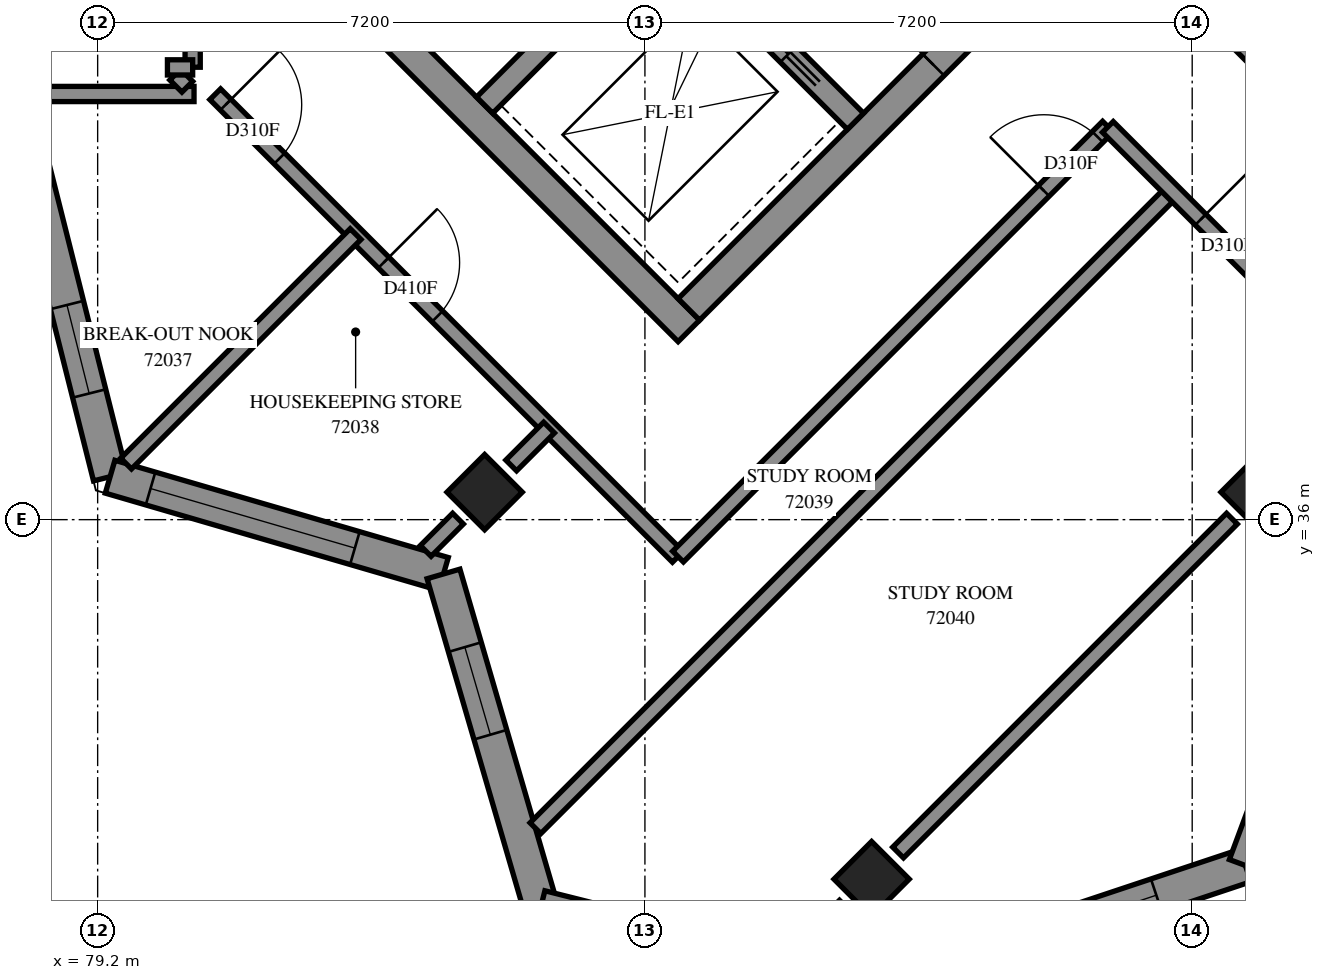
"""IFC4 building model, lengths in metres.
Left out: names, types, materials, properties, quantities, classifications, styles, units other than length and angle.
Written with IfcOpenShell. Run it as: python <this file> out.ifc"""

import sys

from ifc_helpers import new_model, si_unit, direction, frame, frame_2d, origin, origin_2d, place, context, subcontext, project, spatial, polyline, rectangle, outline, extrude, element, fill, save


model = new_model("IFC4")
c1 = context("Model", 3, precision=1e-05, world=origin(), true_north=direction((0.0, 1.0)))
c2 = subcontext(c1, "Body", "Model", "MODEL_VIEW")
j1 = project(units=[si_unit("LENGTHUNIT", "METRE"), si_unit("PLANEANGLEUNIT", "RADIAN")], contexts=[c1])
p1 = place(None, origin())
s1 = spatial("IfcSite", under=j1, at=p1, CompositionType="ELEMENT")
p2 = place(p1, origin())
s2 = spatial("IfcBuilding", under=s1, at=p2, CompositionType="ELEMENT")
p3 = place(p2, frame((0.0, 0.0, 264.2)))
s3 = spatial("IfcBuildingStorey", under=s2, at=p3, CompositionType="ELEMENT", Elevation=264.2)
for number, where, z_axis, x_axis in (
    (1, (84.291, 36.362, 0.0), (0.0, 0.0, 1.0), (0.707, -0.707, 0.0)),
    (2, (94.474, 36.362, 0.0), (0.0, 0.0, 1.0), (0.707, -0.707, 0.0)),
    (3, (89.382, 31.271, 0.0), (0.0, 0.0, 1.0), (0.707, -0.707, 0.0)),
):
    element("IfcColumn", number, at=place(p3, frame(where, z_axis=z_axis, x_axis=x_axis)), inside=s3, PredefinedType="COLUMN", context=c2, shape_type="SweptSolid", body=[
        extrude(rectangle(XDim=0.7, YDim=0.7, at=origin_2d()), origin(), (0.0, 0.0, 1.0), 3.1),
    ])
p4 = place(p3, frame((76.23, 49.231, -0.3), z_axis=(0.0, 0.0, 1.0), x_axis=(0.7071034917, -0.7071100706, 0.0)))
e4 = element("IfcWall", 4, at=p4, inside=s3, PredefinedType="SHEAR", context=c2, shape_type="SweptSolid", body=[
    extrude(rectangle(XDim=15.2, YDim=0.4, at=frame_2d((7.6, 0.0))), origin(), (0.0, 0.0, 1.0), 2.7),
])
p5 = place(p3, frame((86.978, 38.766, -0.3), z_axis=(0.0, 0.0, 1.0), x_axis=(0.7071067812, 0.7071067812, 0.0)))
e5 = element("IfcWall", 5, at=p5, inside=s3, PredefinedType="SHEAR", context=c2, shape_type="SweptSolid", body=[
    extrude(rectangle(XDim=14.4, YDim=0.4, at=frame_2d((7.2, 0.0))), origin(), (0.0, 0.0, 1.0), 2.7),
])
p6 = place(p5, frame((4.55, 0.0, 0.3)))
e6 = element("IfcOpeningElement", 6, at=p6, cuts=e5, PredefinedType="OPENING", context=c2, shape_type="SweptSolid", body=[
    extrude(rectangle(XDim=1.1, YDim=2.1, at=frame_2d((0.55, 1.05))), frame((0.0, 0.21, 0.0), z_axis=(0.0, -1.0, 0.0), x_axis=(1.0, 0.0, 0.0)), (0.0, 0.0, 1.0), 0.42),
])
p7 = place(p5, frame((11.35, 0.0, 0.3)))
e7 = element("IfcOpeningElement", 7, at=p7, cuts=e5, PredefinedType="OPENING", context=c2, shape_type="SweptSolid", body=[
    extrude(rectangle(XDim=1.1, YDim=2.1, at=frame_2d((0.55, 1.05))), frame((0.0, 0.21, 0.0), z_axis=(0.0, -1.0, 0.0), x_axis=(1.0, 0.0, 0.0)), (0.0, 0.0, 1.0), 0.42),
])
p8 = place(p3, frame((84.291, 41.453, 0.0), z_axis=(0.0, 0.0, 1.0), x_axis=(0.7071067812, 0.7071067812, 0.0)))
e8 = element("IfcWall", 8, at=p8, inside=s3, PredefinedType="SOLIDWALL", context=c2, shape_type="SweptSolid", body=[
    extrude(rectangle(XDim=3.3, YDim=0.3, at=frame_2d((1.65, 0.0))), origin(), (0.0, 0.0, 1.0), 3.1),
])
p9 = place(p3, frame((78.988, 51.423, 0.0), z_axis=(0.0, 0.0, 1.0), x_axis=(0.7071067812, -0.7071067812, 0.0)))
e9 = element("IfcWall", 9, at=p9, inside=s3, PredefinedType="SOLIDWALL", context=c2, shape_type="SweptSolid", body=[
    extrude(rectangle(XDim=14.4, YDim=0.3, at=frame_2d((7.2, 0.0))), origin(), (0.0, 0.0, 1.0), 3.1),
])
p10 = place(p9, frame((1.35, 0.0, 0.0)))
e10 = element("IfcOpeningElement", 10, at=p10, cuts=e9, PredefinedType="OPENING", context=c2, shape_type="SweptSolid", body=[
    extrude(rectangle(XDim=0.9, YDim=2.1, at=frame_2d((0.45, 1.05))), frame((0.0, 0.16, 0.0), z_axis=(0.0, -1.0, 0.0), x_axis=(1.0, 0.0, 0.0)), (0.0, 0.0, 1.0), 0.32),
])
p11 = place(p9, frame((4.95, 0.0, 0.0)))
e11 = element("IfcOpeningElement", 11, at=p11, cuts=e9, PredefinedType="OPENING", context=c2, shape_type="SweptSolid", body=[
    extrude(rectangle(XDim=0.9, YDim=2.1, at=frame_2d((0.45, 1.05))), frame((0.0, 0.16, 0.0), z_axis=(0.0, -1.0, 0.0), x_axis=(1.0, 0.0, 0.0)), (0.0, 0.0, 1.0), 0.32),
])
p12 = place(p9, frame((8.55, 0.0, 0.0)))
e12 = element("IfcOpeningElement", 12, at=p12, cuts=e9, PredefinedType="OPENING", context=c2, shape_type="SweptSolid", body=[
    extrude(rectangle(XDim=0.9, YDim=2.1, at=frame_2d((0.45, 1.05))), frame((0.0, 0.16, 0.0), z_axis=(0.0, -1.0, 0.0), x_axis=(1.0, 0.0, 0.0)), (0.0, 0.0, 1.0), 0.32),
])
p13 = place(p9, frame((12.05, 0.0, 0.0)))
e13 = element("IfcOpeningElement", 13, at=p13, cuts=e9, PredefinedType="OPENING", context=c2, shape_type="SweptSolid", body=[
    extrude(rectangle(XDim=1.1, YDim=2.1, at=frame_2d((0.55, 1.05))), frame((0.0, 0.16, 0.0), z_axis=(0.0, -1.0, 0.0), x_axis=(1.0, 0.0, 0.0)), (0.0, 0.0, 1.0), 0.32),
])
p14 = place(p3, frame((89.373, 29.808, 0.0), z_axis=(0.0, 0.0, 1.0), x_axis=(0.9486852236, 0.3162219892, 0.0)))
e14 = element("IfcWall", 14, at=p14, inside=s3, PredefinedType="SOLIDWALL", context=c2, shape_type="SweptSolid", body=[
    extrude(outline(polyline([(-0.066, -0.225), (5.301, -0.225), (5.085, 0.225), (0.066, 0.225), (-0.066, -0.225)])), origin(), (0.0, 0.0, 1.0), 3.1),
])
p15 = place(p14, frame((1.158, 0.0, 0.45)))
e15 = element("IfcOpeningElement", 15, at=p15, cuts=e14, PredefinedType="OPENING", context=c2, shape_type="SweptSolid", body=[
    extrude(rectangle(XDim=2.8, YDim=2.55, at=frame_2d((1.4, 1.275))), frame((0.0, 0.235, 0.0), z_axis=(0.0, -1.0, 0.0), x_axis=(1.0, 0.0, 0.0)), (0.0, 0.0, 1.0), 0.47),
])
p16 = place(p3, frame((94.3, 31.45, 0.0), z_axis=(0.0, 0.0, 1.0), x_axis=(0.3481927166, 0.9374229739, 0.0)))
e16 = element("IfcWall", 16, at=p16, inside=s3, PredefinedType="SOLIDWALL", context=c2, shape_type="SweptSolid", body=[
    extrude(outline(polyline([(-0.108, -0.225), (5.172, -0.225), (5.379, 0.225), (0.108, 0.225), (-0.108, -0.225)])), origin(), (0.0, 0.0, 1.0), 3.1),
])
p17 = place(p16, frame((1.534, 0.0, 0.45)))
e17 = element("IfcOpeningElement", 17, at=p17, cuts=e16, PredefinedType="OPENING", context=c2, shape_type="SweptSolid", body=[
    extrude(rectangle(XDim=2.8, YDim=2.55, at=frame_2d((1.4, 1.275))), frame((0.0, 0.235, 0.0), z_axis=(0.0, -1.0, 0.0), x_axis=(1.0, 0.0, 0.0)), (0.0, 0.0, 1.0), 0.47),
])
p18 = place(p3, frame((78.225, 41.097, 0.0), z_axis=(0.0, 0.0, 1.0), x_axis=(0.2436835103, -0.9698548071, 0.0)))
e18 = element("IfcWall", 18, at=p18, inside=s3, PredefinedType="SOLIDWALL", context=c2, shape_type="SweptSolid", body=[
    extrude(outline(polyline([(0.128, -0.225), (4.802, -0.225), (4.544, 0.225), (-0.128, 0.225), (0.128, -0.225)])), origin(), (0.0, 0.0, 1.0), 3.1),
])
p19 = place(p18, frame((2.344, 0.0, 0.45)))
e19 = element("IfcOpeningElement", 19, at=p19, cuts=e18, PredefinedType="OPENING", context=c2, shape_type="SweptSolid", body=[
    extrude(rectangle(XDim=1.2, YDim=2.55, at=frame_2d((0.6, 1.275))), frame((0.0, 0.235, 0.0), z_axis=(0.0, -1.0, 0.0), x_axis=(1.0, 0.0, 0.0)), (0.0, 0.0, 1.0), 0.47),
])
p20 = place(p3, frame((79.364, 36.565, 0.0), z_axis=(0.0, 0.0, 1.0), x_axis=(0.9600215683, -0.2799260409, 0.0)))
e20 = element("IfcWall", 20, at=p20, inside=s3, PredefinedType="SOLIDWALL", context=c2, shape_type="SweptSolid", body=[
    extrude(outline(polyline([(-0.129, -0.225), (4.446, -0.225), (4.692, 0.225), (0.129, 0.225), (-0.129, -0.225)])), origin(), (0.0, 0.0, 1.0), 3.1),
])
p21 = place(p20, frame((0.554, 0.0, 0.45)))
e21 = element("IfcOpeningElement", 21, at=p21, cuts=e20, PredefinedType="OPENING", context=c2, shape_type="SweptSolid", body=[
    extrude(rectangle(XDim=2.8, YDim=2.55, at=frame_2d((1.4, 1.275))), frame((0.0, 0.235, 0.0), z_axis=(0.0, -1.0, 0.0), x_axis=(1.0, 0.0, 0.0)), (0.0, 0.0, 1.0), 0.47),
])
p22 = place(p3, frame((83.75, 35.286, 0.0), z_axis=(0.0, 0.0, 1.0), x_axis=(0.2799260409, -0.9600215683, 0.0)))
e22 = element("IfcWall", 22, at=p22, inside=s3, PredefinedType="SOLIDWALL", context=c2, shape_type="SweptSolid", body=[
    extrude(outline(polyline([(0.123, -0.225), (4.698, -0.225), (4.44, 0.225), (-0.123, 0.225), (0.123, -0.225)])), origin(), (0.0, 0.0, 1.0), 3.1),
])
p23 = place(p22, frame((1.003, 0.0, 0.45)))
e23 = element("IfcOpeningElement", 23, at=p23, cuts=e22, PredefinedType="OPENING", context=c2, shape_type="SweptSolid", body=[
    extrude(rectangle(XDim=1.2, YDim=2.55, at=frame_2d((0.6, 1.275))), frame((0.0, 0.235, 0.0), z_axis=(0.0, -1.0, 0.0), x_axis=(1.0, 0.0, 0.0)), (0.0, 0.0, 1.0), 0.47),
])
p24 = place(p3, frame((85.029, 30.899, 0.0), z_axis=(0.0, 0.0, 1.0), x_axis=(0.9698515846, -0.2436963354, 0.0)))
e24 = element("IfcWall", 24, at=p24, inside=s3, PredefinedType="SOLIDWALL", context=c2, shape_type="SweptSolid", body=[
    extrude(outline(polyline([(-0.129, -0.225), (4.545, -0.225), (4.414, 0.225), (0.129, 0.225), (-0.129, -0.225)])), origin(), (0.0, 0.0, 1.0), 3.1),
])
p25 = place(p24, frame((2.064, 0.0, 0.45)))
e25 = element("IfcOpeningElement", 25, at=p25, cuts=e24, PredefinedType="OPENING", context=c2, shape_type="SweptSolid", body=[
    extrude(rectangle(XDim=1.2, YDim=2.55, at=frame_2d((0.6, 1.275))), frame((0.0, 0.235, 0.0), z_axis=(0.0, -1.0, 0.0), x_axis=(1.0, 0.0, 0.0)), (0.0, 0.0, 1.0), 0.47),
])
p26 = place(p3, frame((84.96, 31.941, 0.0), z_axis=(0.0, 0.0, 1.0), x_axis=(0.707102563, 0.7071109994, 0.0)))
e26 = element("IfcWall", 26, at=p26, inside=s3, PredefinedType="PARTITIONING", context=c2, shape_type="SweptSolid", body=[
    extrude(rectangle(XDim=11.853, YDim=0.2, at=frame_2d((5.927, 0.0))), origin(), (0.0, 0.0, 1.0), 3.1),
])
p27 = place(p3, frame((80.747, 41.597, 0.0), z_axis=(0.0, 0.0, 1.0), x_axis=(0.7071067812, -0.7071067812, 0.0)))
e27 = element("IfcWall", 27, at=p27, inside=s3, PredefinedType="PARTITIONING", context=c2, shape_type="SweptSolid", body=[
    extrude(rectangle(XDim=8.607, YDim=0.2, at=frame_2d((4.303, 0.0))), origin(), (0.0, 0.0, 1.0), 3.1),
])
p28 = place(p27, frame((0.195, 0.0, 0.0)))
e28 = element("IfcOpeningElement", 28, at=p28, cuts=e27, PredefinedType="OPENING", context=c2, shape_type="SweptSolid", body=[
    extrude(rectangle(XDim=1.0, YDim=2.1, at=frame_2d((0.5, 1.05))), frame((0.0, 0.11, 0.0), z_axis=(0.0, -1.0, 0.0), x_axis=(1.0, 0.0, 0.0)), (0.0, 0.0, 1.0), 0.22),
])
p29 = place(p27, frame((3.133, 0.0, 0.0)))
e29 = element("IfcOpeningElement", 29, at=p29, cuts=e27, PredefinedType="OPENING", context=c2, shape_type="SweptSolid", body=[
    extrude(rectangle(XDim=1.0, YDim=2.1, at=frame_2d((0.5, 1.05))), frame((0.0, 0.11, 0.0), z_axis=(0.0, -1.0, 0.0), x_axis=(1.0, 0.0, 0.0)), (0.0, 0.0, 1.0), 0.22),
])
p30 = place(p3, frame((86.836, 35.514, 0.0), z_axis=(0.0, 0.0, 1.0), x_axis=(0.7071067812, 0.7071067812, 0.0)))
e30 = element("IfcWall", 30, at=p30, inside=s3, PredefinedType="PARTITIONING", context=c2, shape_type="SweptSolid", body=[
    extrude(rectangle(XDim=7.999, YDim=0.2, at=frame_2d((3.999, 0.0))), origin(), (0.0, 0.0, 1.0), 3.1),
])
p31 = place(p30, frame((6.807, 0.0, 0.0)))
e31 = element("IfcOpeningElement", 31, at=p31, cuts=e30, PredefinedType="OPENING", context=c2, shape_type="SweptSolid", body=[
    extrude(rectangle(XDim=1.0, YDim=2.1, at=frame_2d((0.5, 1.05))), frame((0.0, 0.11, 0.0), z_axis=(0.0, -1.0, 0.0), x_axis=(1.0, 0.0, 0.0)), (0.0, 0.0, 1.0), 0.22),
])
p32 = place(p3, frame((89.731, 31.621, 0.0), z_axis=(0.0, 0.0, 1.0), x_axis=(0.7071067812, 0.7071067812, 0.0)))
e32 = element("IfcWall", 32, at=p32, inside=s3, PredefinedType="PARTITIONING", context=c2, shape_type="SweptSolid", body=[
    extrude(rectangle(XDim=6.211, YDim=0.2, at=frame_2d((3.106, 0.0))), origin(), (0.0, 0.0, 1.0), 2.6),
])
p33 = place(p3, frame((93.905, 42.581, 0.0), z_axis=(0.0, 0.0, 1.0), x_axis=(0.7071067812, -0.7071067812, 0.0)))
e33 = element("IfcWall", 33, at=p33, inside=s3, PredefinedType="PARTITIONING", context=c2, shape_type="SweptSolid", body=[
    extrude(rectangle(XDim=4.8, YDim=0.2, at=frame_2d((2.4, 0.0))), origin(), (0.0, 0.0, 1.0), 3.1),
])
p34 = place(p33, frame((1.725, 0.0, 0.0)))
e34 = element("IfcOpeningElement", 34, at=p34, cuts=e33, PredefinedType="OPENING", context=c2, shape_type="SweptSolid", body=[
    extrude(rectangle(XDim=1.0, YDim=2.1, at=frame_2d((0.5, 1.05))), frame((0.0, 0.11, 0.0), z_axis=(0.0, -1.0, 0.0), x_axis=(1.0, 0.0, 0.0)), (0.0, 0.0, 1.0), 0.22),
])
p35 = place(p3, frame((92.491, 41.167, 0.0), z_axis=(0.0, 0.0, 1.0), x_axis=(0.7071067812, -0.7071067812, 0.0)))
e35 = element("IfcWall", 35, at=p35, inside=s3, PredefinedType="PARTITIONING", context=c2, shape_type="SweptSolid", body=[
    extrude(rectangle(XDim=4.8, YDim=0.2, at=frame_2d((2.4, 0.0))), origin(), (0.0, 0.0, 1.0), 3.1),
])
p36 = place(p35, frame((1.725, 0.0, 0.0)))
e36 = element("IfcOpeningElement", 36, at=p36, cuts=e35, PredefinedType="OPENING", context=c2, shape_type="SweptSolid", body=[
    extrude(rectangle(XDim=1.0, YDim=2.1, at=frame_2d((0.5, 1.05))), frame((0.0, 0.11, 0.0), z_axis=(0.0, -1.0, 0.0), x_axis=(1.0, 0.0, 0.0)), (0.0, 0.0, 1.0), 0.22),
])
p37 = place(p3, frame((79.574, 36.738, 0.0), z_axis=(0.0, 0.0, 1.0), x_axis=(0.7071067812, 0.7071067812, 0.0)))
e37 = element("IfcWall", 37, at=p37, inside=s3, PredefinedType="PARTITIONING", context=c2, shape_type="SweptSolid", body=[
    extrude(rectangle(XDim=4.269, YDim=0.2, at=frame_2d((2.135, 0.0))), origin(), (0.0, 0.0, 1.0), 3.1),
])
p38 = place(p3, frame((77.381, 41.6, 0.0), z_axis=(0.0, 0.0, 1.0), x_axis=(1.0, 0.0, 0.0)))
e38 = element("IfcWall", 38, at=p38, inside=s3, PredefinedType="PARTITIONING", context=c2, shape_type="SweptSolid", body=[
    extrude(rectangle(XDim=3.087, YDim=0.2, at=frame_2d((1.543, 0.0))), origin(), (0.0, 0.0, 1.0), 3.1),
])
p39 = place(p3, frame((80.45, 41.952, 0.0), z_axis=(0.0, 0.0, 1.0), x_axis=(0.0, 1.0, 0.0)))
e39 = element("IfcWall", 39, at=p39, inside=s3, PredefinedType="PARTITIONING", context=c2, shape_type="SweptSolid", body=[
    extrude(rectangle(XDim=2.498, YDim=0.2, at=frame_2d((1.249, 0.0))), origin(), (0.0, 0.0, 1.0), 3.1),
])
p40 = place(p3, frame((88.393, 30.286, 0.0), z_axis=(0.0, 0.0, 1.0), x_axis=(0.7083277461, 0.7058837043, 0.0)))
e40 = element("IfcWall", 40, at=p40, inside=s3, PredefinedType="PARTITIONING", context=c2, shape_type="SweptSolid", body=[
    extrude(rectangle(XDim=0.9, YDim=0.2, at=frame_2d((0.45, 0.0))), origin(), (0.0, 0.0, 1.0), 3.1),
])
p41 = place(p3, frame((84.641, 36.713, 0.0), z_axis=(0.0, 0.0, 1.0), x_axis=(0.7071067812, 0.7071067812, 0.0)))
e41 = element("IfcWall", 41, at=p41, inside=s3, PredefinedType="PARTITIONING", context=c2, shape_type="SweptSolid", body=[
    extrude(rectangle(XDim=0.704, YDim=0.2, at=frame_2d((0.352, 0.0))), origin(), (0.0, 0.0, 1.0), 3.1),
])
p42 = place(p3, frame((83.516, 35.588, 0.0), z_axis=(0.0, 0.0, 1.0), x_axis=(0.7070235383, 0.7071900143, 0.0)))
e42 = element("IfcWall", 42, at=p42, inside=s3, PredefinedType="PARTITIONING", context=c2, shape_type="SweptSolid", body=[
    extrude(rectangle(XDim=0.601, YDim=0.2, at=frame_2d((0.3, 0.0))), origin(), (0.0, 0.0, 1.0), 3.1),
])
p43 = place(p3, frame((80.221, 41.855, 0.0), z_axis=(0.0, 0.0, 1.0), x_axis=(0.7068844555, -0.707329037, 0.0)))
e43 = element("IfcWall", 43, at=p43, inside=s3, PredefinedType="PARTITIONING", context=c2, shape_type="SweptSolid", body=[
    extrude(rectangle(XDim=0.225, YDim=0.2, at=frame_2d((0.112, 0.0))), origin(), (0.0, 0.0, 1.0), 3.1),
])
p44 = place(p3, frame((80.118, 41.95, 0.0), z_axis=(0.0, 0.0, 1.0), x_axis=(1.0, 0.0, 0.0)))
e44 = element("IfcWall", 44, at=p44, inside=s3, PredefinedType="PARTITIONING", context=c2, shape_type="SweptSolid", body=[
    extrude(rectangle(XDim=0.332, YDim=0.2, at=frame_2d((0.166, 0.0))), origin(), (0.0, 0.0, 1.0), 3.1),
])
p45 = place(p15, origin())
e45 = element("IfcWindow", 45, at=p45, inside=s3, PartitioningType="SINGLE_PANEL", PredefinedType="WINDOW", context=c2, shape_type="SweptSolid", body=[
    extrude(rectangle(XDim=2.8, YDim=2.55, at=frame_2d((1.4, 1.275))), frame((0.0, 0.205, 0.0), z_axis=(0.0, -1.0, 0.0), x_axis=(1.0, 0.0, 0.0)), (0.0, 0.0, 1.0), 0.06),
])
fill(e15, e45)
p46 = place(p19, origin())
e46 = element("IfcWindow", 46, at=p46, inside=s3, PartitioningType="SINGLE_PANEL", PredefinedType="WINDOW", context=c2, shape_type="SweptSolid", body=[
    extrude(rectangle(XDim=1.2, YDim=2.55, at=frame_2d((0.6, 1.275))), frame((0.0, 0.205, 0.0), z_axis=(0.0, -1.0, 0.0), x_axis=(1.0, 0.0, 0.0)), (0.0, 0.0, 1.0), 0.06),
])
fill(e19, e46)
p47 = place(p21, origin())
e47 = element("IfcWindow", 47, at=p47, inside=s3, PartitioningType="SINGLE_PANEL", PredefinedType="WINDOW", context=c2, shape_type="SweptSolid", body=[
    extrude(rectangle(XDim=2.8, YDim=2.55, at=frame_2d((1.4, 1.275))), frame((0.0, 0.205, 0.0), z_axis=(0.0, -1.0, 0.0), x_axis=(1.0, 0.0, 0.0)), (0.0, 0.0, 1.0), 0.06),
])
fill(e21, e47)
p48 = place(p23, origin())
e48 = element("IfcWindow", 48, at=p48, inside=s3, PartitioningType="SINGLE_PANEL", PredefinedType="WINDOW", context=c2, shape_type="SweptSolid", body=[
    extrude(rectangle(XDim=1.2, YDim=2.55, at=frame_2d((0.6, 1.275))), frame((0.0, 0.205, 0.0), z_axis=(0.0, -1.0, 0.0), x_axis=(1.0, 0.0, 0.0)), (0.0, 0.0, 1.0), 0.06),
])
fill(e23, e48)
p49 = place(p6, origin())
e49 = element("IfcDoor", 49, at=p49, inside=s3, OperationType="DOUBLE_DOOR_SINGLE_SWING", PredefinedType="DOOR", context=c2, shape_type="SweptSolid", body=[
    extrude(rectangle(XDim=1.1, YDim=2.1, at=frame_2d((0.55, 1.05))), frame((0.0, 0.025, 0.0), z_axis=(0.0, -1.0, 0.0), x_axis=(1.0, 0.0, 0.0)), (0.0, 0.0, 1.0), 0.05),
])
fill(e6, e49)
p50 = place(p13, origin())
e50 = element("IfcDoor", 50, at=p50, inside=s3, OperationType="SLIDING_TO_RIGHT", PredefinedType="DOOR", context=c2, shape_type="SweptSolid", body=[
    extrude(rectangle(XDim=1.1, YDim=2.1, at=frame_2d((0.55, 1.05))), frame((0.0, 0.025, 0.0), z_axis=(0.0, -1.0, 0.0), x_axis=(1.0, 0.0, 0.0)), (0.0, 0.0, 1.0), 0.05),
])
fill(e13, e50)
p51 = place(p28, origin())
e51 = element("IfcDoor", 51, at=p51, inside=s3, OperationType="SINGLE_SWING_LEFT", PredefinedType="DOOR", context=c2, shape_type="SweptSolid", body=[
    extrude(rectangle(XDim=1.0, YDim=2.1, at=frame_2d((0.5, 1.05))), frame((0.0, 0.025, 0.0), z_axis=(0.0, -1.0, 0.0), x_axis=(1.0, 0.0, 0.0)), (0.0, 0.0, 1.0), 0.05),
])
fill(e28, e51)
p52 = place(p29, origin())
e52 = element("IfcDoor", 52, at=p52, inside=s3, OperationType="SINGLE_SWING_LEFT", PredefinedType="DOOR", context=c2, shape_type="SweptSolid", body=[
    extrude(rectangle(XDim=1.0, YDim=2.1, at=frame_2d((0.5, 1.05))), frame((0.0, 0.025, 0.0), z_axis=(0.0, -1.0, 0.0), x_axis=(1.0, 0.0, 0.0)), (0.0, 0.0, 1.0), 0.05),
])
fill(e29, e52)
p53 = place(p31, origin())
e53 = element("IfcDoor", 53, at=p53, inside=s3, OperationType="SINGLE_SWING_RIGHT", PredefinedType="DOOR", context=c2, shape_type="SweptSolid", body=[
    extrude(rectangle(XDim=1.0, YDim=2.1, at=frame_2d((0.5, 1.05))), frame((0.0, 0.025, 0.0), z_axis=(0.0, -1.0, 0.0), x_axis=(1.0, 0.0, 0.0)), (0.0, 0.0, 1.0), 0.05),
])
fill(e31, e53)
p54 = place(p36, origin())
e54 = element("IfcDoor", 54, at=p54, inside=s3, OperationType="SINGLE_SWING_LEFT", PredefinedType="DOOR", context=c2, shape_type="SweptSolid", body=[
    extrude(rectangle(XDim=1.0, YDim=2.1, at=frame_2d((0.5, 1.05))), frame((0.0, 0.025, 0.0), z_axis=(0.0, -1.0, 0.0), x_axis=(1.0, 0.0, 0.0)), (0.0, 0.0, 1.0), 0.05),
])
fill(e36, e54)
save(model, sys.argv[1])
